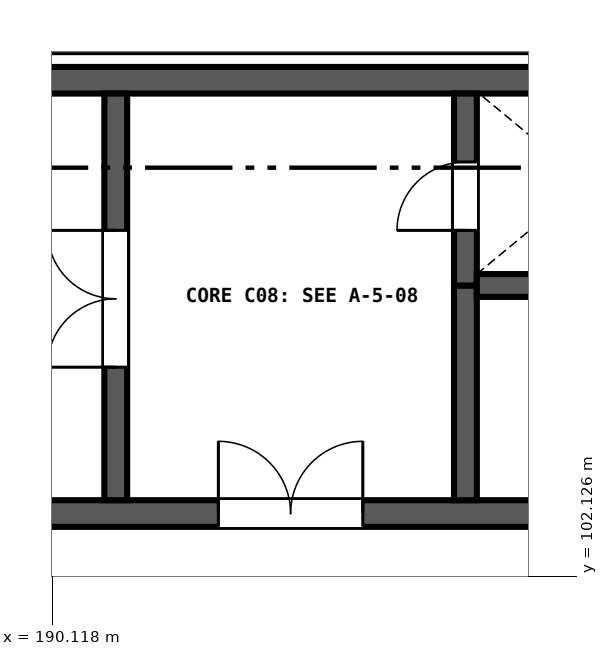
"""IFC4 building model, lengths in metres.
Left out: names, types, materials, properties, quantities, classifications, styles, units other than length and angle.
Written with IfcOpenShell. Run it as: python <this file> out.ifc"""

import sys

from ifc_helpers import new_model, si_unit, direction, frame, frame_2d, origin, place, context, subcontext, project, spatial, rectangle, extrude, element, fill, save


model = new_model("IFC4")
c1 = context("Model", 3, precision=1e-05, world=origin(), true_north=direction((0.0, 1.0)))
c2 = subcontext(c1, "Body", "Model", "MODEL_VIEW")
j1 = project(units=[si_unit("LENGTHUNIT", "METRE"), si_unit("PLANEANGLEUNIT", "RADIAN")], contexts=[c1])
p1 = place(None, origin())
s1 = spatial("IfcSite", under=j1, at=p1, CompositionType="ELEMENT")
p2 = place(p1, origin())
s2 = spatial("IfcBuilding", under=s1, at=p2, CompositionType="ELEMENT")
p3 = place(p2, frame((0.0, 0.0, 9.6)))
s3 = spatial("IfcBuildingStorey", under=s2, at=p3, CompositionType="ELEMENT", Elevation=9.6)
p4 = place(p3, frame((180.9, 102.95, 0.0), z_axis=(0.0, 0.0, 1.0), x_axis=(1.0, 0.0, 0.0)))
e1 = element("IfcWall", 1, at=p4, inside=s3, PredefinedType="SHEAR", context=c2, shape_type="SweptSolid", body=[
    extrude(rectangle(XDim=18.0, YDim=0.35, at=frame_2d((9.0, 0.0))), origin(), (0.0, 0.0, 1.0), 4.5),
])
p5 = place(p4, frame((11.4, 0.0, 0.0)))
e2 = element("IfcOpeningElement", 2, at=p5, cuts=e1, PredefinedType="OPENING", context=c2, shape_type="SweptSolid", body=[
    extrude(rectangle(XDim=1.9, YDim=2.25, at=frame_2d((0.95, 1.125))), frame((0.0, 0.185, 0.0), z_axis=(0.0, -1.0, 0.0), x_axis=(1.0, 0.0, 0.0)), (0.0, 0.0, 1.0), 0.37),
])
p6 = place(p3, frame((198.9, 108.65, 0.0), z_axis=(0.0, 0.0, 1.0), x_axis=(-1.0, 0.0, 0.0)))
e3 = element("IfcWall", 3, at=p6, inside=s3, PredefinedType="SHEAR", context=c2, shape_type="SweptSolid", body=[
    extrude(rectangle(XDim=18.0, YDim=0.35, at=frame_2d((9.0, 0.0))), origin(), (0.0, 0.0, 1.0), 4.5),
])
p7 = place(p3, frame((190.95, 103.125, 0.0), z_axis=(0.0, 0.0, 1.0), x_axis=(0.0, 1.0, 0.0)))
e4 = element("IfcWall", 4, at=p7, inside=s3, PredefinedType="SHEAR", context=c2, shape_type="SweptSolid", body=[
    extrude(rectangle(XDim=5.35, YDim=0.3, at=frame_2d((2.675, 0.0))), origin(), (0.0, 0.0, 1.0), 4.5),
])
p8 = place(p7, frame((1.75, 0.0, 0.0)))
e5 = element("IfcOpeningElement", 5, at=p8, cuts=e4, PredefinedType="OPENING", context=c2, shape_type="SweptSolid", body=[
    extrude(rectangle(XDim=1.8, YDim=2.25, at=frame_2d((0.9, 1.125))), frame((0.0, 0.16, 0.0), z_axis=(0.0, -1.0, 0.0), x_axis=(1.0, 0.0, 0.0)), (0.0, 0.0, 1.0), 0.32),
])
p9 = place(p3, frame((195.55, 103.125, 0.0), z_axis=(0.0, 0.0, 1.0), x_axis=(0.0, 1.0, 0.0)))
e6 = element("IfcWall", 6, at=p9, inside=s3, PredefinedType="SHEAR", context=c2, shape_type="SweptSolid", body=[
    extrude(rectangle(XDim=2.825, YDim=0.3, at=frame_2d((1.413, 0.0))), origin(), (0.0, 0.0, 1.0), 4.5),
])
p10 = place(p3, frame((195.55, 105.95, 0.0), z_axis=(0.0, 0.0, 1.0), x_axis=(0.0, 1.0, 0.0)))
e7 = element("IfcWall", 7, at=p10, inside=s3, PredefinedType="SHEAR", context=c2, shape_type="SweptSolid", body=[
    extrude(rectangle(XDim=2.525, YDim=0.3, at=frame_2d((1.263, 0.0))), origin(), (0.0, 0.0, 1.0), 4.5),
])
p11 = place(p10, frame((0.725, 0.0, 0.0)))
e8 = element("IfcOpeningElement", 8, at=p11, cuts=e7, PredefinedType="OPENING", context=c2, shape_type="SweptSolid", body=[
    extrude(rectangle(XDim=0.9, YDim=2.1, at=frame_2d((0.45, 1.05))), frame((0.0, 0.16, 0.0), z_axis=(0.0, -1.0, 0.0), x_axis=(1.0, 0.0, 0.0)), (0.0, 0.0, 1.0), 0.32),
])
p12 = place(p3, frame((195.7, 105.95, 0.0), z_axis=(0.0, 0.0, 1.0), x_axis=(1.0, 0.0, 0.0)))
e9 = element("IfcWall", 9, at=p12, inside=s3, PredefinedType="SHEAR", context=c2, shape_type="SweptSolid", body=[
    extrude(rectangle(XDim=2.875, YDim=0.3, at=frame_2d((1.438, 0.0))), origin(), (0.0, 0.0, 1.0), 4.5),
])
p13 = place(p8, origin())
e10 = element("IfcDoor", 10, at=p13, inside=s3, OperationType="DOUBLE_DOOR_SINGLE_SWING", PredefinedType="DOOR", context=c2, shape_type="SweptSolid", body=[
    extrude(rectangle(XDim=1.8, YDim=2.25, at=frame_2d((0.9, 1.125))), frame((0.0, 0.025, 0.0), z_axis=(0.0, -1.0, 0.0), x_axis=(1.0, 0.0, 0.0)), (0.0, 0.0, 1.0), 0.05),
])
fill(e5, e10)
p14 = place(p11, origin())
e11 = element("IfcDoor", 11, at=p14, inside=s3, OperationType="SINGLE_SWING_LEFT", PredefinedType="DOOR", context=c2, shape_type="SweptSolid", body=[
    extrude(rectangle(XDim=0.9, YDim=2.1, at=frame_2d((0.45, 1.05))), frame((0.0, 0.025, 0.0), z_axis=(0.0, -1.0, 0.0), x_axis=(1.0, 0.0, 0.0)), (0.0, 0.0, 1.0), 0.05),
])
fill(e8, e11)
p15 = place(p5, origin())
e12 = element("IfcDoor", 12, at=p15, inside=s3, OperationType="DOUBLE_DOOR_SINGLE_SWING", PredefinedType="DOOR", context=c2, shape_type="SweptSolid", body=[
    extrude(rectangle(XDim=1.9, YDim=2.25, at=frame_2d((0.95, 1.125))), frame((0.0, 0.025, 0.0), z_axis=(0.0, -1.0, 0.0), x_axis=(1.0, 0.0, 0.0)), (0.0, 0.0, 1.0), 0.05),
])
fill(e2, e12)
save(model, sys.argv[1])
